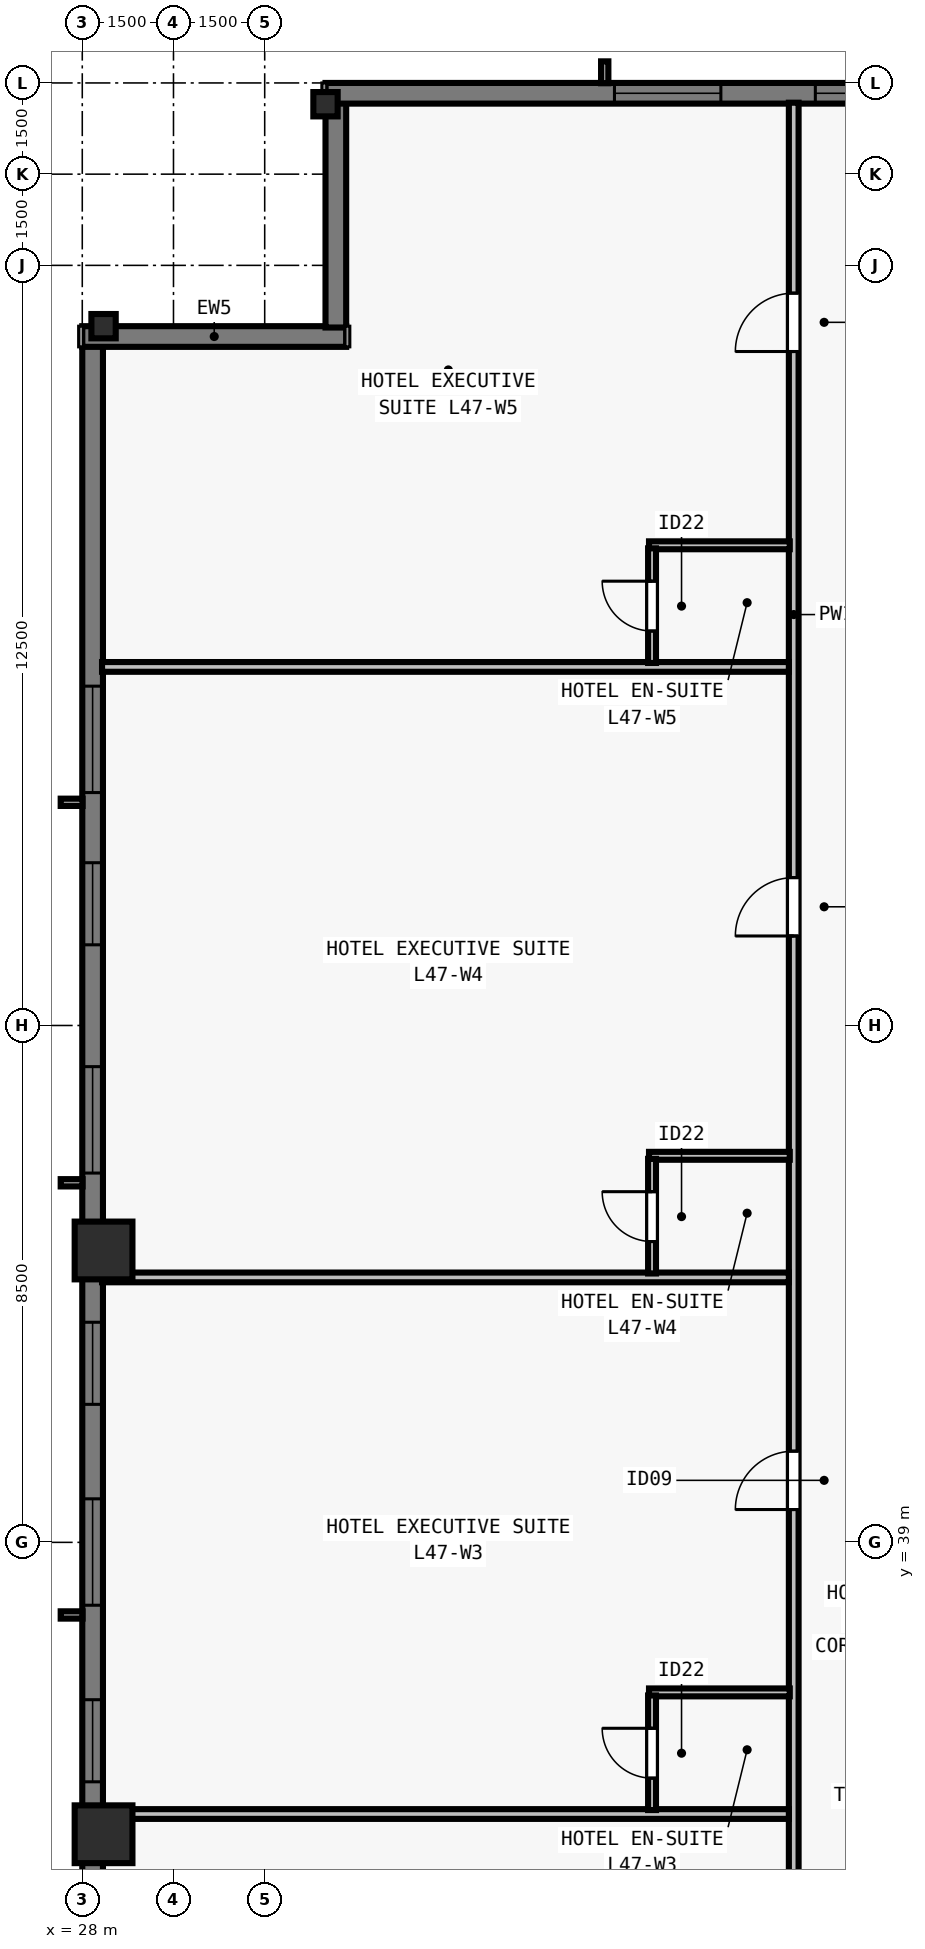
"""IFC4 building model, lengths in metres.
Left out: names, types, materials, properties, quantities, classifications, styles, units other than length and angle.
Written with IfcOpenShell. Run it as: python <this file> out.ifc"""

import sys

from ifc_helpers import new_model, si_unit, direction, frame, frame_2d, origin, origin_2d, place, context, subcontext, project, spatial, rectangle, i_section, extrude, element, fill, save


model = new_model("IFC4")
c1 = context("Model", 3, precision=1e-05, world=origin(), true_north=direction((0.0, 1.0)))
c2 = subcontext(c1, "Body", "Model", "MODEL_VIEW")
j1 = project(units=[si_unit("LENGTHUNIT", "METRE"), si_unit("PLANEANGLEUNIT", "RADIAN")], contexts=[c1])
p1 = place(None, origin())
s1 = spatial("IfcSite", under=j1, at=p1, CompositionType="ELEMENT")
p2 = place(p1, origin())
s2 = spatial("IfcBuilding", under=s1, at=p2, CompositionType="ELEMENT")
p3 = place(p2, frame((0.0, 0.0, 172.5)))
s3 = spatial("IfcBuildingStorey", under=s2, at=p3, CompositionType="ELEMENT", Elevation=172.5)
for number, where, z_axis, x_axis in (
    (1, (32.0, 62.65, 0.0), (0.0, 0.0, 1.0), (1.0, 0.0, 0.0)),
    (2, (28.35, 59.0, 0.0), (0.0, 0.0, 1.0), (0.0, 1.0, 0.0)),
):
    element("IfcColumn", number, at=place(p3, frame(where, z_axis=z_axis, x_axis=x_axis)), inside=s3, PredefinedType="COLUMN", context=c2, shape_type="SweptSolid", body=[
        extrude(i_section(OverallWidth=0.4, OverallDepth=0.4, WebThickness=0.022, FlangeThickness=0.036, at=origin_2d()), origin(), (0.0, 0.0, 1.0), 3.5),
    ])
for number, where, z_axis, x_axis in (
    (3, (28.35, 43.8, 0.0), (0.0, 0.0, 1.0), (0.0, 1.0, 0.0)),
    (4, (28.35, 34.2, 0.0), (0.0, 0.0, 1.0), (0.0, 1.0, 0.0)),
):
    element("IfcColumn", number, at=place(p3, frame(where, z_axis=z_axis, x_axis=x_axis)), inside=s3, PredefinedType="COLUMN", context=c2, shape_type="SweptSolid", body=[
        extrude(rectangle(XDim=0.95, YDim=0.95, at=origin_2d()), origin(), (0.0, 0.0, 1.0), 3.5),
    ])
p4 = place(p3, frame((28.17, 19.0, 0.0), z_axis=(0.0, 0.0, 1.0), x_axis=(0.0, 1.0, 0.0)))
e5 = element("IfcWall", 5, at=p4, inside=s3, PredefinedType="SOLIDWALL", context=c2, shape_type="SweptSolid", body=[
    extrude(rectangle(XDim=39.682, YDim=0.34, at=frame_2d((19.841, 0.0))), origin(), (0.0, 0.0, 1.0), 3.28),
])
p5 = place(p4, frame((6.002, 0.0, 0.8)))
e6 = element("IfcOpeningElement", 6, at=p5, cuts=e5, PredefinedType="OPENING", context=c2, shape_type="SweptSolid", body=[
    extrude(rectangle(XDim=1.75, YDim=1.66, at=frame_2d((0.875, 0.83))), frame((0.0, 0.18, 0.0), z_axis=(0.0, -1.0, 0.0), x_axis=(1.0, 0.0, 0.0)), (0.0, 0.0, 1.0), 0.36),
])
p6 = place(p4, frame((8.505, 0.0, 0.8)))
e7 = element("IfcOpeningElement", 7, at=p6, cuts=e5, PredefinedType="OPENING", context=c2, shape_type="SweptSolid", body=[
    extrude(rectangle(XDim=1.35, YDim=1.66, at=frame_2d((0.675, 0.83))), frame((0.0, 0.18, 0.0), z_axis=(0.0, -1.0, 0.0), x_axis=(1.0, 0.0, 0.0)), (0.0, 0.0, 1.0), 0.36),
])
p7 = place(p4, frame((11.859, 0.0, 0.8)))
e8 = element("IfcOpeningElement", 8, at=p7, cuts=e5, PredefinedType="OPENING", context=c2, shape_type="SweptSolid", body=[
    extrude(rectangle(XDim=1.75, YDim=1.66, at=frame_2d((0.875, 0.83))), frame((0.0, 0.18, 0.0), z_axis=(0.0, -1.0, 0.0), x_axis=(1.0, 0.0, 0.0)), (0.0, 0.0, 1.0), 0.36),
])
p8 = place(p4, frame((16.062, 0.0, 0.8)))
e9 = element("IfcOpeningElement", 9, at=p8, cuts=e5, PredefinedType="OPENING", context=c2, shape_type="SweptSolid", body=[
    extrude(rectangle(XDim=1.35, YDim=1.66, at=frame_2d((0.675, 0.83))), frame((0.0, 0.18, 0.0), z_axis=(0.0, -1.0, 0.0), x_axis=(1.0, 0.0, 0.0)), (0.0, 0.0, 1.0), 0.36),
])
p9 = place(p4, frame((18.966, 0.0, 0.8)))
e10 = element("IfcOpeningElement", 10, at=p9, cuts=e5, PredefinedType="OPENING", context=c2, shape_type="SweptSolid", body=[
    extrude(rectangle(XDim=1.75, YDim=1.66, at=frame_2d((0.875, 0.83))), frame((0.0, 0.18, 0.0), z_axis=(0.0, -1.0, 0.0), x_axis=(1.0, 0.0, 0.0)), (0.0, 0.0, 1.0), 0.36),
])
p10 = place(p4, frame((22.27, 0.0, 0.8)))
e11 = element("IfcOpeningElement", 11, at=p10, cuts=e5, PredefinedType="OPENING", context=c2, shape_type="SweptSolid", body=[
    extrude(rectangle(XDim=1.35, YDim=1.66, at=frame_2d((0.675, 0.83))), frame((0.0, 0.18, 0.0), z_axis=(0.0, -1.0, 0.0), x_axis=(1.0, 0.0, 0.0)), (0.0, 0.0, 1.0), 0.36),
])
p11 = place(p4, frame((26.073, 0.0, 0.8)))
e12 = element("IfcOpeningElement", 12, at=p11, cuts=e5, PredefinedType="OPENING", context=c2, shape_type="SweptSolid", body=[
    extrude(rectangle(XDim=1.75, YDim=1.66, at=frame_2d((0.875, 0.83))), frame((0.0, 0.18, 0.0), z_axis=(0.0, -1.0, 0.0), x_axis=(1.0, 0.0, 0.0)), (0.0, 0.0, 1.0), 0.36),
])
p12 = place(p4, frame((29.827, 0.0, 0.8)))
e13 = element("IfcOpeningElement", 13, at=p12, cuts=e5, PredefinedType="OPENING", context=c2, shape_type="SweptSolid", body=[
    extrude(rectangle(XDim=1.35, YDim=1.66, at=frame_2d((0.675, 0.83))), frame((0.0, 0.18, 0.0), z_axis=(0.0, -1.0, 0.0), x_axis=(1.0, 0.0, 0.0)), (0.0, 0.0, 1.0), 0.36),
])
p13 = place(p4, frame((32.33, 0.0, 0.8)))
e14 = element("IfcOpeningElement", 14, at=p13, cuts=e5, PredefinedType="OPENING", context=c2, shape_type="SweptSolid", body=[
    extrude(rectangle(XDim=1.75, YDim=1.66, at=frame_2d((0.875, 0.83))), frame((0.0, 0.18, 0.0), z_axis=(0.0, -1.0, 0.0), x_axis=(1.0, 0.0, 0.0)), (0.0, 0.0, 1.0), 0.36),
])
p14 = place(p3, frame((28.0, 58.83, 0.0), z_axis=(0.0, 0.0, 1.0), x_axis=(1.0, 0.0, 0.0)))
e15 = element("IfcWall", 15, at=p14, inside=s3, PredefinedType="SOLIDWALL", context=c2, shape_type="SweptSolid", body=[
    extrude(rectangle(XDim=4.34, YDim=0.34, at=frame_2d((2.17, 0.0))), origin(), (0.0, 0.0, 1.0), 3.28),
])
p15 = place(p3, frame((32.17, 58.978, 0.0), z_axis=(0.0, 0.0, 1.0), x_axis=(0.0, 1.0, 0.0)))
e16 = element("IfcWall", 16, at=p15, inside=s3, PredefinedType="SOLIDWALL", context=c2, shape_type="SweptSolid", body=[
    extrude(rectangle(XDim=3.704, YDim=0.34, at=frame_2d((1.852, 0.0))), origin(), (0.0, 0.0, 1.0), 3.28),
])
p16 = place(p3, frame((32.0, 62.83, 0.0), z_axis=(0.0, 0.0, 1.0), x_axis=(1.0, 0.0, 0.0)))
e17 = element("IfcWall", 17, at=p16, inside=s3, PredefinedType="SOLIDWALL", context=c2, shape_type="SweptSolid", body=[
    extrude(rectangle(XDim=39.682, YDim=0.34, at=frame_2d((19.841, 0.0))), origin(), (0.0, 0.0, 1.0), 3.28),
])
p17 = place(p16, frame((4.752, 0.0, 0.8)))
e18 = element("IfcOpeningElement", 18, at=p17, cuts=e17, PredefinedType="OPENING", context=c2, shape_type="SweptSolid", body=[
    extrude(rectangle(XDim=1.75, YDim=1.66, at=frame_2d((0.875, 0.83))), frame((0.0, 0.18, 0.0), z_axis=(0.0, -1.0, 0.0), x_axis=(1.0, 0.0, 0.0)), (0.0, 0.0, 1.0), 0.36),
])
p18 = place(p16, frame((8.055, 0.0, 0.8)))
e19 = element("IfcOpeningElement", 19, at=p18, cuts=e17, PredefinedType="OPENING", context=c2, shape_type="SweptSolid", body=[
    extrude(rectangle(XDim=1.35, YDim=1.66, at=frame_2d((0.675, 0.83))), frame((0.0, 0.18, 0.0), z_axis=(0.0, -1.0, 0.0), x_axis=(1.0, 0.0, 0.0)), (0.0, 0.0, 1.0), 0.36),
])
p19 = place(p16, frame((11.859, 0.0, 0.8)))
e20 = element("IfcOpeningElement", 20, at=p19, cuts=e17, PredefinedType="OPENING", context=c2, shape_type="SweptSolid", body=[
    extrude(rectangle(XDim=1.75, YDim=1.66, at=frame_2d((0.875, 0.83))), frame((0.0, 0.18, 0.0), z_axis=(0.0, -1.0, 0.0), x_axis=(1.0, 0.0, 0.0)), (0.0, 0.0, 1.0), 0.36),
])
p20 = place(p16, frame((18.966, 0.0, 0.8)))
e21 = element("IfcOpeningElement", 21, at=p20, cuts=e17, PredefinedType="OPENING", context=c2, shape_type="SweptSolid", body=[
    extrude(rectangle(XDim=1.75, YDim=1.66, at=frame_2d((0.875, 0.83))), frame((0.0, 0.18, 0.0), z_axis=(0.0, -1.0, 0.0), x_axis=(1.0, 0.0, 0.0)), (0.0, 0.0, 1.0), 0.36),
])
p21 = place(p16, frame((21.469, 0.0, 0.8)))
e22 = element("IfcOpeningElement", 22, at=p21, cuts=e17, PredefinedType="OPENING", context=c2, shape_type="SweptSolid", body=[
    extrude(rectangle(XDim=1.35, YDim=1.66, at=frame_2d((0.675, 0.83))), frame((0.0, 0.18, 0.0), z_axis=(0.0, -1.0, 0.0), x_axis=(1.0, 0.0, 0.0)), (0.0, 0.0, 1.0), 0.36),
])
p22 = place(p16, frame((26.073, 0.0, 0.8)))
e23 = element("IfcOpeningElement", 23, at=p22, cuts=e17, PredefinedType="OPENING", context=c2, shape_type="SweptSolid", body=[
    extrude(rectangle(XDim=1.75, YDim=1.66, at=frame_2d((0.875, 0.83))), frame((0.0, 0.18, 0.0), z_axis=(0.0, -1.0, 0.0), x_axis=(1.0, 0.0, 0.0)), (0.0, 0.0, 1.0), 0.36),
])
p23 = place(p16, frame((29.827, 0.0, 0.8)))
e24 = element("IfcOpeningElement", 24, at=p23, cuts=e17, PredefinedType="OPENING", context=c2, shape_type="SweptSolid", body=[
    extrude(rectangle(XDim=1.35, YDim=1.66, at=frame_2d((0.675, 0.83))), frame((0.0, 0.18, 0.0), z_axis=(0.0, -1.0, 0.0), x_axis=(1.0, 0.0, 0.0)), (0.0, 0.0, 1.0), 0.36),
])
p24 = place(p16, frame((34.47, 0.0, 0.8)))
e25 = element("IfcOpeningElement", 25, at=p24, cuts=e17, PredefinedType="OPENING", context=c2, shape_type="SweptSolid", body=[
    extrude(rectangle(XDim=0.9, YDim=1.66, at=frame_2d((0.45, 0.83))), frame((0.0, 0.18, 0.0), z_axis=(0.0, -1.0, 0.0), x_axis=(1.0, 0.0, 0.0)), (0.0, 0.0, 1.0), 0.36),
])
p25 = place(p3, frame((39.7, 15.325, 0.0), z_axis=(0.0, 0.0, 1.0), x_axis=(0.0, 1.0, 0.0)))
e26 = element("IfcWall", 26, at=p25, inside=s3, PredefinedType="PARTITIONING", context=c2, shape_type="SweptSolid", body=[
    extrude(rectangle(XDim=47.35, YDim=0.16, at=frame_2d((23.675, 0.0))), origin(), (0.0, 0.0, 1.0), 2.555),
])
p26 = place(p25, frame((5.451, 0.0, 0.0)))
e27 = element("IfcOpeningElement", 27, at=p26, cuts=e26, PredefinedType="OPENING", context=c2, shape_type="SweptSolid", body=[
    extrude(rectangle(XDim=0.96, YDim=2.15, at=frame_2d((0.48, 1.075))), frame((0.0, 0.09, 0.0), z_axis=(0.0, -1.0, 0.0), x_axis=(1.0, 0.0, 0.0)), (0.0, 0.0, 1.0), 0.18),
])
p27 = place(p25, frame((14.783, 0.0, 0.0)))
e28 = element("IfcOpeningElement", 28, at=p27, cuts=e26, PredefinedType="OPENING", context=c2, shape_type="SweptSolid", body=[
    extrude(rectangle(XDim=0.96, YDim=2.15, at=frame_2d((0.48, 1.075))), frame((0.0, 0.09, 0.0), z_axis=(0.0, -1.0, 0.0), x_axis=(1.0, 0.0, 0.0)), (0.0, 0.0, 1.0), 0.18),
])
p28 = place(p25, frame((24.215, 0.0, 0.0)))
e29 = element("IfcOpeningElement", 29, at=p28, cuts=e26, PredefinedType="OPENING", context=c2, shape_type="SweptSolid", body=[
    extrude(rectangle(XDim=0.96, YDim=2.15, at=frame_2d((0.48, 1.075))), frame((0.0, 0.09, 0.0), z_axis=(0.0, -1.0, 0.0), x_axis=(1.0, 0.0, 0.0)), (0.0, 0.0, 1.0), 0.18),
])
p29 = place(p25, frame((33.647, 0.0, 0.0)))
e30 = element("IfcOpeningElement", 30, at=p29, cuts=e26, PredefinedType="OPENING", context=c2, shape_type="SweptSolid", body=[
    extrude(rectangle(XDim=0.96, YDim=2.15, at=frame_2d((0.48, 1.075))), frame((0.0, 0.09, 0.0), z_axis=(0.0, -1.0, 0.0), x_axis=(1.0, 0.0, 0.0)), (0.0, 0.0, 1.0), 0.18),
])
p30 = place(p25, frame((43.258, 0.0, 0.0)))
e31 = element("IfcOpeningElement", 31, at=p30, cuts=e26, PredefinedType="OPENING", context=c2, shape_type="SweptSolid", body=[
    extrude(rectangle(XDim=0.96, YDim=2.15, at=frame_2d((0.48, 1.075))), frame((0.0, 0.09, 0.0), z_axis=(0.0, -1.0, 0.0), x_axis=(1.0, 0.0, 0.0)), (0.0, 0.0, 1.0), 0.18),
])
p31 = place(p3, frame((28.325, 34.533, 0.0), z_axis=(0.0, 0.0, 1.0), x_axis=(1.0, 0.0, 0.0)))
e32 = element("IfcWall", 32, at=p31, inside=s3, PredefinedType="PARTITIONING", context=c2, shape_type="SweptSolid", body=[
    extrude(rectangle(XDim=11.295, YDim=0.16, at=frame_2d((5.647, 0.0))), origin(), (0.0, 0.0, 1.0), 2.896),
])
p32 = place(p3, frame((37.32, 36.533, 0.0), z_axis=(0.0, 0.0, 1.0), x_axis=(1.0, 0.0, 0.0)))
e33 = element("IfcWall", 33, at=p32, inside=s3, PredefinedType="PLUMBINGWALL", context=c2, shape_type="SweptSolid", body=[
    extrude(rectangle(XDim=2.315, YDim=0.13, at=frame_2d((1.157, 0.0))), origin(), (0.0, 0.0, 1.0), 3.28),
])
p33 = place(p3, frame((37.37, 34.598, 0.0), z_axis=(0.0, 0.0, 1.0), x_axis=(0.0, 1.0, 0.0)))
e34 = element("IfcWall", 34, at=p33, inside=s3, PredefinedType="PLUMBINGWALL", context=c2, shape_type="SweptSolid", body=[
    extrude(rectangle(XDim=1.885, YDim=0.13, at=frame_2d((0.942, 0.0))), origin(), (0.0, 0.0, 1.0), 3.28),
])
p34 = place(p33, frame((0.525, 0.0, 0.0)))
e35 = element("IfcOpeningElement", 35, at=p34, cuts=e34, PredefinedType="OPENING", context=c2, shape_type="SweptSolid", body=[
    extrude(rectangle(XDim=0.82, YDim=2.1, at=frame_2d((0.41, 1.05))), frame((0.0, 0.075, 0.0), z_axis=(0.0, -1.0, 0.0), x_axis=(1.0, 0.0, 0.0)), (0.0, 0.0, 1.0), 0.15),
])
p35 = place(p3, frame((28.325, 43.357, 0.0), z_axis=(0.0, 0.0, 1.0), x_axis=(1.0, 0.0, 0.0)))
e36 = element("IfcWall", 36, at=p35, inside=s3, PredefinedType="PARTITIONING", context=c2, shape_type="SweptSolid", body=[
    extrude(rectangle(XDim=11.295, YDim=0.16, at=frame_2d((5.647, 0.0))), origin(), (0.0, 0.0, 1.0), 2.896),
])
p36 = place(p3, frame((37.32, 45.357, 0.0), z_axis=(0.0, 0.0, 1.0), x_axis=(1.0, 0.0, 0.0)))
e37 = element("IfcWall", 37, at=p36, inside=s3, PredefinedType="PLUMBINGWALL", context=c2, shape_type="SweptSolid", body=[
    extrude(rectangle(XDim=2.315, YDim=0.13, at=frame_2d((1.157, 0.0))), origin(), (0.0, 0.0, 1.0), 3.28),
])
p37 = place(p3, frame((37.37, 43.422, 0.0), z_axis=(0.0, 0.0, 1.0), x_axis=(0.0, 1.0, 0.0)))
e38 = element("IfcWall", 38, at=p37, inside=s3, PredefinedType="PLUMBINGWALL", context=c2, shape_type="SweptSolid", body=[
    extrude(rectangle(XDim=1.885, YDim=0.13, at=frame_2d((0.942, 0.0))), origin(), (0.0, 0.0, 1.0), 3.28),
])
p38 = place(p37, frame((0.525, 0.0, 0.0)))
e39 = element("IfcOpeningElement", 39, at=p38, cuts=e38, PredefinedType="OPENING", context=c2, shape_type="SweptSolid", body=[
    extrude(rectangle(XDim=0.82, YDim=2.1, at=frame_2d((0.41, 1.05))), frame((0.0, 0.075, 0.0), z_axis=(0.0, -1.0, 0.0), x_axis=(1.0, 0.0, 0.0)), (0.0, 0.0, 1.0), 0.15),
])
p39 = place(p3, frame((28.325, 53.396, 0.0), z_axis=(0.0, 0.0, 1.0), x_axis=(1.0, 0.0, 0.0)))
e40 = element("IfcWall", 40, at=p39, inside=s3, PredefinedType="PARTITIONING", context=c2, shape_type="SweptSolid", body=[
    extrude(rectangle(XDim=11.295, YDim=0.16, at=frame_2d((5.647, 0.0))), origin(), (0.0, 0.0, 1.0), 2.896),
])
p40 = place(p3, frame((37.32, 55.396, 0.0), z_axis=(0.0, 0.0, 1.0), x_axis=(1.0, 0.0, 0.0)))
e41 = element("IfcWall", 41, at=p40, inside=s3, PredefinedType="PLUMBINGWALL", context=c2, shape_type="SweptSolid", body=[
    extrude(rectangle(XDim=2.315, YDim=0.13, at=frame_2d((1.157, 0.0))), origin(), (0.0, 0.0, 1.0), 3.28),
])
p41 = place(p3, frame((37.37, 53.462, 0.0), z_axis=(0.0, 0.0, 1.0), x_axis=(0.0, 1.0, 0.0)))
e42 = element("IfcWall", 42, at=p41, inside=s3, PredefinedType="PLUMBINGWALL", context=c2, shape_type="SweptSolid", body=[
    extrude(rectangle(XDim=1.885, YDim=0.13, at=frame_2d((0.942, 0.0))), origin(), (0.0, 0.0, 1.0), 3.28),
])
p42 = place(p41, frame((0.525, 0.0, 0.0)))
e43 = element("IfcOpeningElement", 43, at=p42, cuts=e42, PredefinedType="OPENING", context=c2, shape_type="SweptSolid", body=[
    extrude(rectangle(XDim=0.82, YDim=2.1, at=frame_2d((0.41, 1.05))), frame((0.0, 0.075, 0.0), z_axis=(0.0, -1.0, 0.0), x_axis=(1.0, 0.0, 0.0)), (0.0, 0.0, 1.0), 0.15),
])
p43 = place(p8, origin())
e44 = element("IfcWindow", 44, at=p43, inside=s3, PartitioningType="SINGLE_PANEL", PredefinedType="WINDOW", context=c2, shape_type="SweptSolid", body=[
    extrude(rectangle(XDim=1.35, YDim=1.66, at=frame_2d((0.675, 0.83))), frame((0.0, -0.05, 0.0), z_axis=(0.0, -1.0, 0.0), x_axis=(1.0, 0.0, 0.0)), (0.0, 0.0, 1.0), 0.06),
])
fill(e9, e44)
p44 = place(p9, origin())
e45 = element("IfcWindow", 45, at=p44, inside=s3, PartitioningType="SINGLE_PANEL", PredefinedType="WINDOW", context=c2, shape_type="SweptSolid", body=[
    extrude(rectangle(XDim=1.75, YDim=1.66, at=frame_2d((0.875, 0.83))), frame((0.0, -0.05, 0.0), z_axis=(0.0, -1.0, 0.0), x_axis=(1.0, 0.0, 0.0)), (0.0, 0.0, 1.0), 0.06),
])
fill(e10, e45)
p45 = place(p10, origin())
e46 = element("IfcWindow", 46, at=p45, inside=s3, PartitioningType="SINGLE_PANEL", PredefinedType="WINDOW", context=c2, shape_type="SweptSolid", body=[
    extrude(rectangle(XDim=1.35, YDim=1.66, at=frame_2d((0.675, 0.83))), frame((0.0, -0.05, 0.0), z_axis=(0.0, -1.0, 0.0), x_axis=(1.0, 0.0, 0.0)), (0.0, 0.0, 1.0), 0.06),
])
fill(e11, e46)
p46 = place(p11, origin())
e47 = element("IfcWindow", 47, at=p46, inside=s3, PartitioningType="SINGLE_PANEL", PredefinedType="WINDOW", context=c2, shape_type="SweptSolid", body=[
    extrude(rectangle(XDim=1.75, YDim=1.66, at=frame_2d((0.875, 0.83))), frame((0.0, -0.05, 0.0), z_axis=(0.0, -1.0, 0.0), x_axis=(1.0, 0.0, 0.0)), (0.0, 0.0, 1.0), 0.06),
])
fill(e12, e47)
p47 = place(p12, origin())
e48 = element("IfcWindow", 48, at=p47, inside=s3, PartitioningType="SINGLE_PANEL", PredefinedType="WINDOW", context=c2, shape_type="SweptSolid", body=[
    extrude(rectangle(XDim=1.35, YDim=1.66, at=frame_2d((0.675, 0.83))), frame((0.0, -0.05, 0.0), z_axis=(0.0, -1.0, 0.0), x_axis=(1.0, 0.0, 0.0)), (0.0, 0.0, 1.0), 0.06),
])
fill(e13, e48)
p48 = place(p13, origin())
e49 = element("IfcWindow", 49, at=p48, inside=s3, PartitioningType="SINGLE_PANEL", PredefinedType="WINDOW", context=c2, shape_type="SweptSolid", body=[
    extrude(rectangle(XDim=1.75, YDim=1.66, at=frame_2d((0.875, 0.83))), frame((0.0, -0.05, 0.0), z_axis=(0.0, -1.0, 0.0), x_axis=(1.0, 0.0, 0.0)), (0.0, 0.0, 1.0), 0.06),
])
fill(e14, e49)
p49 = place(p17, origin())
e50 = element("IfcWindow", 50, at=p49, inside=s3, PartitioningType="SINGLE_PANEL", PredefinedType="WINDOW", context=c2, shape_type="SweptSolid", body=[
    extrude(rectangle(XDim=1.75, YDim=1.66, at=frame_2d((0.875, 0.83))), frame((0.0, -0.05, 0.0), z_axis=(0.0, -1.0, 0.0), x_axis=(1.0, 0.0, 0.0)), (0.0, 0.0, 1.0), 0.06),
])
fill(e18, e50)
p50 = place(p18, origin())
e51 = element("IfcWindow", 51, at=p50, inside=s3, PartitioningType="SINGLE_PANEL", PredefinedType="WINDOW", context=c2, shape_type="SweptSolid", body=[
    extrude(rectangle(XDim=1.35, YDim=1.66, at=frame_2d((0.675, 0.83))), frame((0.0, -0.05, 0.0), z_axis=(0.0, -1.0, 0.0), x_axis=(1.0, 0.0, 0.0)), (0.0, 0.0, 1.0), 0.06),
])
fill(e19, e51)
p51 = place(p34, origin())
e52 = element("IfcDoor", 52, at=p51, inside=s3, OperationType="SINGLE_SWING_RIGHT", PredefinedType="DOOR", context=c2, shape_type="SweptSolid", body=[
    extrude(rectangle(XDim=0.82, YDim=2.1, at=frame_2d((0.41, 1.05))), frame((0.0, 0.025, 0.0), z_axis=(0.0, -1.0, 0.0), x_axis=(1.0, 0.0, 0.0)), (0.0, 0.0, 1.0), 0.05),
])
fill(e35, e52)
p52 = place(p28, origin())
e53 = element("IfcDoor", 53, at=p52, inside=s3, OperationType="SINGLE_SWING_LEFT", PredefinedType="DOOR", context=c2, shape_type="SweptSolid", body=[
    extrude(rectangle(XDim=0.96, YDim=2.15, at=frame_2d((0.48, 1.075))), frame((0.0, 0.025, 0.0), z_axis=(0.0, -1.0, 0.0), x_axis=(1.0, 0.0, 0.0)), (0.0, 0.0, 1.0), 0.05),
])
fill(e29, e53)
p53 = place(p38, origin())
e54 = element("IfcDoor", 54, at=p53, inside=s3, OperationType="SINGLE_SWING_RIGHT", PredefinedType="DOOR", context=c2, shape_type="SweptSolid", body=[
    extrude(rectangle(XDim=0.82, YDim=2.1, at=frame_2d((0.41, 1.05))), frame((0.0, 0.025, 0.0), z_axis=(0.0, -1.0, 0.0), x_axis=(1.0, 0.0, 0.0)), (0.0, 0.0, 1.0), 0.05),
])
fill(e39, e54)
p54 = place(p29, origin())
e55 = element("IfcDoor", 55, at=p54, inside=s3, OperationType="SINGLE_SWING_LEFT", PredefinedType="DOOR", context=c2, shape_type="SweptSolid", body=[
    extrude(rectangle(XDim=0.96, YDim=2.15, at=frame_2d((0.48, 1.075))), frame((0.0, 0.025, 0.0), z_axis=(0.0, -1.0, 0.0), x_axis=(1.0, 0.0, 0.0)), (0.0, 0.0, 1.0), 0.05),
])
fill(e30, e55)
p55 = place(p42, origin())
e56 = element("IfcDoor", 56, at=p55, inside=s3, OperationType="SINGLE_SWING_RIGHT", PredefinedType="DOOR", context=c2, shape_type="SweptSolid", body=[
    extrude(rectangle(XDim=0.82, YDim=2.1, at=frame_2d((0.41, 1.05))), frame((0.0, 0.025, 0.0), z_axis=(0.0, -1.0, 0.0), x_axis=(1.0, 0.0, 0.0)), (0.0, 0.0, 1.0), 0.05),
])
fill(e43, e56)
p56 = place(p30, origin())
e57 = element("IfcDoor", 57, at=p56, inside=s3, OperationType="SINGLE_SWING_LEFT", PredefinedType="DOOR", context=c2, shape_type="SweptSolid", body=[
    extrude(rectangle(XDim=0.96, YDim=2.15, at=frame_2d((0.48, 1.075))), frame((0.0, 0.025, 0.0), z_axis=(0.0, -1.0, 0.0), x_axis=(1.0, 0.0, 0.0)), (0.0, 0.0, 1.0), 0.05),
])
fill(e31, e57)
save(model, sys.argv[1])
